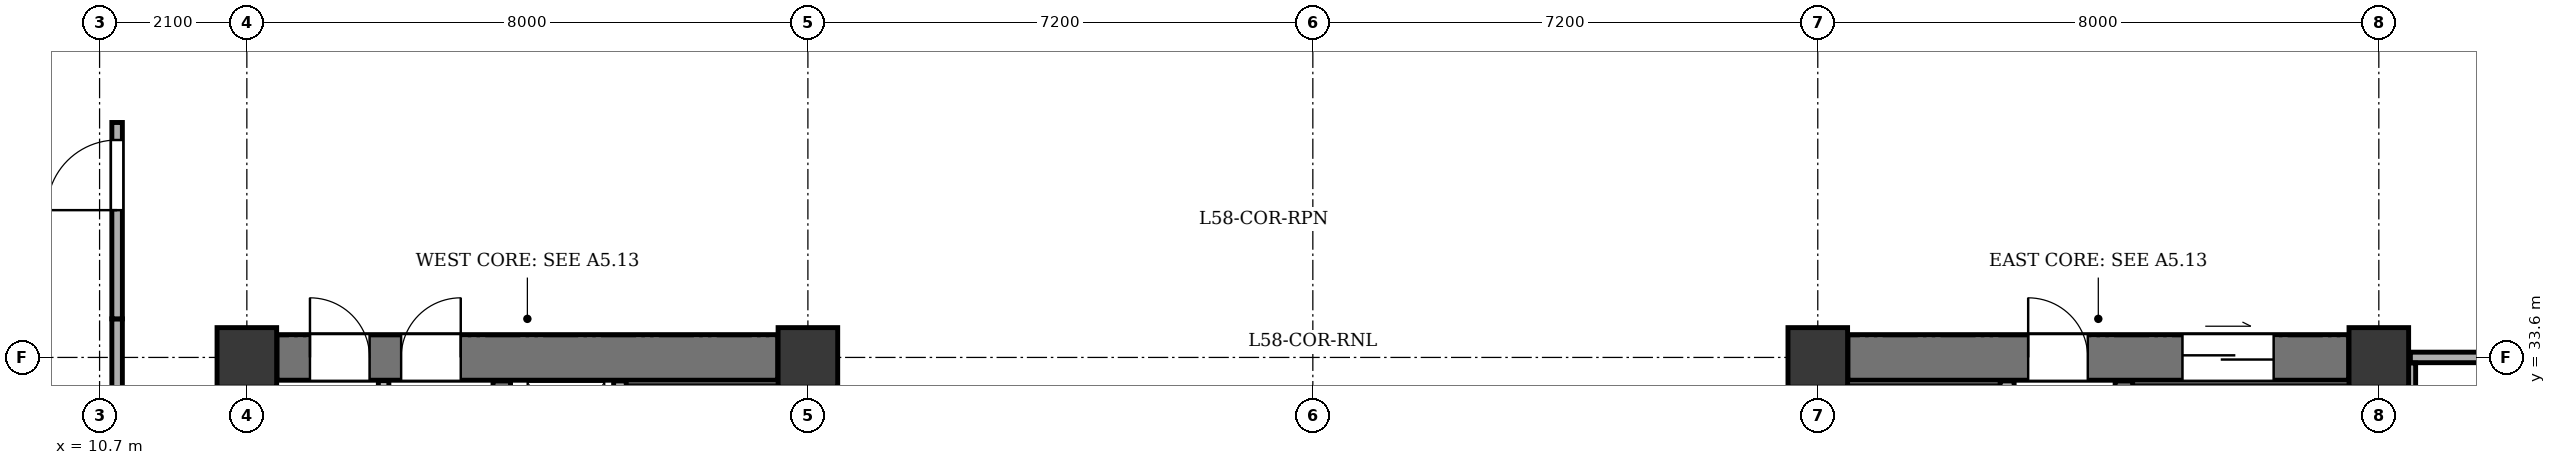
"""IFC4 building model, lengths in metres.
Left out: names, types, materials, properties, quantities, classifications, styles, units other than length and angle.
Written with IfcOpenShell. Run it as: python <this file> out.ifc"""

import sys

from ifc_helpers import new_model, si_unit, direction, frame, frame_2d, origin, origin_2d, place, context, subcontext, project, spatial, rectangle, extrude, element, fill, save


model = new_model("IFC4")
c1 = context("Model", 3, precision=1e-05, world=origin(), true_north=direction((0.0, 1.0)))
c2 = subcontext(c1, "Body", "Model", "MODEL_VIEW")
j1 = project(units=[si_unit("LENGTHUNIT", "METRE"), si_unit("PLANEANGLEUNIT", "RADIAN")], contexts=[c1])
p1 = place(None, origin())
s1 = spatial("IfcSite", under=j1, at=p1, CompositionType="ELEMENT")
p2 = place(p1, origin())
s2 = spatial("IfcBuilding", under=s1, at=p2, CompositionType="ELEMENT")
p3 = place(p2, frame((0.0, 0.0, 224.5)))
s3 = spatial("IfcBuildingStorey", under=s2, at=p3, CompositionType="ELEMENT", Elevation=224.5)
for number, where, z_axis, x_axis in (
    (1, (12.8, 33.6, 0.0), (0.0, 0.0, 1.0), (1.0, 0.0, 0.0)),
    (2, (20.8, 33.6, 0.0), (0.0, 0.0, 1.0), (1.0, 0.0, 0.0)),
    (3, (35.2, 33.6, 0.0), (0.0, 0.0, 1.0), (1.0, 0.0, 0.0)),
    (4, (43.2, 33.6, 0.0), (0.0, 0.0, 1.0), (1.0, 0.0, 0.0)),
):
    element("IfcColumn", number, at=place(p3, frame(where, z_axis=z_axis, x_axis=x_axis)), inside=s3, PredefinedType="COLUMN", context=c2, shape_type="SweptSolid", body=[
        extrude(rectangle(XDim=0.85, YDim=0.85, at=origin_2d()), origin(), (0.0, 0.0, 1.0), 3.4),
    ])
p4 = place(p3, frame((13.23, 33.6, 0.0), z_axis=(0.0, 0.0, 1.0), x_axis=(1.0, 0.0, 0.0)))
e5 = element("IfcWall", 5, at=p4, inside=s3, PredefinedType="SHEAR", context=c2, shape_type="SweptSolid", body=[
    extrude(rectangle(XDim=7.14, YDim=0.65, at=frame_2d((3.57, 0.0))), origin(), (0.0, 0.0, 1.0), 2.95),
])
p5 = place(p4, frame((0.47, 0.0, 0.0)))
e6 = element("IfcOpeningElement", 6, at=p5, cuts=e5, PredefinedType="OPENING", context=c2, shape_type="SweptSolid", body=[
    extrude(rectangle(XDim=0.85, YDim=2.02, at=frame_2d((0.425, 1.01))), frame((0.0, 0.335, 0.0), z_axis=(0.0, -1.0, 0.0), x_axis=(1.0, 0.0, 0.0)), (0.0, 0.0, 1.0), 0.67),
])
p6 = place(p4, frame((1.77, 0.0, 0.0)))
e7 = element("IfcOpeningElement", 7, at=p6, cuts=e5, PredefinedType="OPENING", context=c2, shape_type="SweptSolid", body=[
    extrude(rectangle(XDim=0.85, YDim=2.02, at=frame_2d((0.425, 1.01))), frame((0.0, 0.335, 0.0), z_axis=(0.0, -1.0, 0.0), x_axis=(1.0, 0.0, 0.0)), (0.0, 0.0, 1.0), 0.67),
])
p7 = place(p3, frame((16.435, 21.135, 0.0), z_axis=(0.0, 0.0, 1.0), x_axis=(0.0, 1.0, 0.0)))
e8 = element("IfcWall", 8, at=p7, inside=s3, PredefinedType="SHEAR", context=c2, shape_type="SweptSolid", body=[
    extrude(rectangle(XDim=12.13, YDim=0.25, at=frame_2d((6.065, 0.0))), origin(), (0.0, 0.0, 1.0), 2.95),
])
p8 = place(p7, frame((0.515, 0.0, 0.0)))
e9 = element("IfcOpeningElement", 9, at=p8, cuts=e8, PredefinedType="OPENING", context=c2, shape_type="SweptSolid", body=[
    extrude(rectangle(XDim=1.2, YDim=2.15, at=frame_2d((0.6, 1.075))), frame((0.0, 0.135, 0.0), z_axis=(0.0, -1.0, 0.0), x_axis=(1.0, 0.0, 0.0)), (0.0, 0.0, 1.0), 0.27),
])
p9 = place(p7, frame((2.665, 0.0, 0.0)))
e10 = element("IfcOpeningElement", 10, at=p9, cuts=e8, PredefinedType="OPENING", context=c2, shape_type="SweptSolid", body=[
    extrude(rectangle(XDim=1.15, YDim=2.15, at=frame_2d((0.575, 1.075))), frame((0.0, 0.135, 0.0), z_axis=(0.0, -1.0, 0.0), x_axis=(1.0, 0.0, 0.0)), (0.0, 0.0, 1.0), 0.27),
])
p10 = place(p3, frame((18.12, 31.17, 0.0), z_axis=(0.0, 0.0, 1.0), x_axis=(0.0, 1.0, 0.0)))
e11 = element("IfcWall", 11, at=p10, inside=s3, PredefinedType="PARTITIONING", context=c2, shape_type="SweptSolid", body=[
    extrude(rectangle(XDim=2.095, YDim=0.18, at=frame_2d((1.047, 0.0))), origin(), (0.0, 0.0, 1.0), 2.95),
])
p11 = place(p3, frame((35.63, 33.6, 0.0), z_axis=(0.0, 0.0, 1.0), x_axis=(1.0, 0.0, 0.0)))
e12 = element("IfcWall", 12, at=p11, inside=s3, PredefinedType="SHEAR", context=c2, shape_type="SweptSolid", body=[
    extrude(rectangle(XDim=7.14, YDim=0.65, at=frame_2d((3.57, 0.0))), origin(), (0.0, 0.0, 1.0), 2.95),
])
p12 = place(p11, frame((4.77, 0.0, 0.0)))
e13 = element("IfcOpeningElement", 13, at=p12, cuts=e12, PredefinedType="OPENING", context=c2, shape_type="SweptSolid", body=[
    extrude(rectangle(XDim=1.3, YDim=2.15, at=frame_2d((0.65, 1.075))), frame((0.0, 0.335, 0.0), z_axis=(0.0, -1.0, 0.0), x_axis=(1.0, 0.0, 0.0)), (0.0, 0.0, 1.0), 0.67),
])
p13 = place(p11, frame((2.57, 0.0, 0.0)))
e14 = element("IfcOpeningElement", 14, at=p13, cuts=e12, PredefinedType="OPENING", context=c2, shape_type="SweptSolid", body=[
    extrude(rectangle(XDim=0.85, YDim=2.02, at=frame_2d((0.425, 1.01))), frame((0.0, 0.335, 0.0), z_axis=(0.0, -1.0, 0.0), x_axis=(1.0, 0.0, 0.0)), (0.0, 0.0, 1.0), 0.67),
])
p14 = place(p3, frame((39.565, 21.135, 0.0), z_axis=(0.0, 0.0, 1.0), x_axis=(0.0, 1.0, 0.0)))
e15 = element("IfcWall", 15, at=p14, inside=s3, PredefinedType="SHEAR", context=c2, shape_type="SweptSolid", body=[
    extrude(rectangle(XDim=12.13, YDim=0.25, at=frame_2d((6.065, 0.0))), origin(), (0.0, 0.0, 1.0), 2.95),
])
p15 = place(p14, frame((0.515, 0.0, 0.0)))
e16 = element("IfcOpeningElement", 16, at=p15, cuts=e15, PredefinedType="OPENING", context=c2, shape_type="SweptSolid", body=[
    extrude(rectangle(XDim=1.2, YDim=2.15, at=frame_2d((0.6, 1.075))), frame((0.0, 0.135, 0.0), z_axis=(0.0, -1.0, 0.0), x_axis=(1.0, 0.0, 0.0)), (0.0, 0.0, 1.0), 0.27),
])
p16 = place(p14, frame((2.665, 0.0, 0.0)))
e17 = element("IfcOpeningElement", 17, at=p16, cuts=e15, PredefinedType="OPENING", context=c2, shape_type="SweptSolid", body=[
    extrude(rectangle(XDim=1.15, YDim=2.15, at=frame_2d((0.575, 1.075))), frame((0.0, 0.135, 0.0), z_axis=(0.0, -1.0, 0.0), x_axis=(1.0, 0.0, 0.0)), (0.0, 0.0, 1.0), 0.27),
])
p17 = place(p3, frame((37.9, 25.27, 0.0), z_axis=(0.0, 0.0, 1.0), x_axis=(0.0, 1.0, 0.0)))
e18 = element("IfcWall", 18, at=p17, inside=s3, PredefinedType="SOLIDWALL", context=c2, shape_type="SweptSolid", body=[
    extrude(rectangle(XDim=7.995, YDim=0.2, at=frame_2d((3.998, 0.0))), origin(), (0.0, 0.0, 1.0), 2.95),
])
p18 = place(p3, frame((14.75, 30.96, 0.0), z_axis=(0.0, 0.0, 1.0), x_axis=(0.0, 1.0, 0.0)))
e19 = element("IfcWall", 19, at=p18, inside=s3, PredefinedType="PARTITIONING", context=c2, shape_type="SweptSolid", body=[
    extrude(rectangle(XDim=2.31, YDim=0.15, at=frame_2d((1.155, 0.0))), origin(), (0.0, 0.0, 1.0), 2.95),
])
p19 = place(p18, frame((0.47, 0.0, 0.0)))
e20 = element("IfcOpeningElement", 20, at=p19, cuts=e19, PredefinedType="OPENING", context=c2, shape_type="SweptSolid", body=[
    extrude(rectangle(XDim=0.85, YDim=2.02, at=frame_2d((0.425, 1.01))), frame((0.0, 0.085, 0.0), z_axis=(0.0, -1.0, 0.0), x_axis=(1.0, 0.0, 0.0)), (0.0, 0.0, 1.0), 0.17),
])
p20 = place(p3, frame((10.95, 20.25, 0.0), z_axis=(0.0, 0.0, 1.0), x_axis=(0.0, 1.0, 0.0)))
e21 = element("IfcWall", 21, at=p20, inside=s3, PredefinedType="PARTITIONING", context=c2, shape_type="SweptSolid", body=[
    extrude(rectangle(XDim=13.9, YDim=0.15, at=frame_2d((6.95, 0.0))), origin(), (0.0, 0.0, 1.0), 2.335),
])
p21 = place(p3, frame((10.95, 34.15, 0.0), z_axis=(0.0, 0.0, 1.0), x_axis=(0.0, 1.0, 0.0)))
e22 = element("IfcWall", 22, at=p21, inside=s3, PredefinedType="PARTITIONING", context=c2, shape_type="SweptSolid", body=[
    extrude(rectangle(XDim=2.8, YDim=0.15, at=frame_2d((1.4, 0.0))), origin(), (0.0, 0.0, 1.0), 2.335),
])
p22 = place(p21, frame((1.55, 0.0, 0.0)))
e23 = element("IfcOpeningElement", 23, at=p22, cuts=e22, PredefinedType="OPENING", context=c2, shape_type="SweptSolid", body=[
    extrude(rectangle(XDim=1.0, YDim=2.1, at=frame_2d((0.5, 1.05))), frame((0.0, 0.085, 0.0), z_axis=(0.0, -1.0, 0.0), x_axis=(1.0, 0.0, 0.0)), (0.0, 0.0, 1.0), 0.17),
])
p23 = place(p3, frame((43.65, 33.6, 0.0), z_axis=(0.0, 0.0, 1.0), x_axis=(1.0, 0.0, 0.0)))
e24 = element("IfcWall", 24, at=p23, inside=s3, PredefinedType="PARTITIONING", context=c2, shape_type="SweptSolid", body=[
    extrude(rectangle(XDim=5.305, YDim=0.15, at=frame_2d((2.653, 0.0))), origin(), (0.0, 0.0, 1.0), 2.135),
])
p24 = place(p3, frame((43.65, 20.25, 0.0), z_axis=(0.0, 0.0, 1.0), x_axis=(0.0, 1.0, 0.0)))
e25 = element("IfcWall", 25, at=p24, inside=s3, PredefinedType="PARTITIONING", context=c2, shape_type="SweptSolid", body=[
    extrude(rectangle(XDim=13.27, YDim=0.15, at=frame_2d((6.635, 0.0))), origin(), (0.0, 0.0, 1.0), 2.95),
])
p25 = place(p5, origin())
e26 = element("IfcDoor", 26, at=p25, inside=s3, OperationType="SINGLE_SWING_LEFT", PredefinedType="DOOR", context=c2, shape_type="SweptSolid", body=[
    extrude(rectangle(XDim=0.85, YDim=2.02, at=frame_2d((0.425, 1.01))), frame((0.0, 0.025, 0.0), z_axis=(0.0, -1.0, 0.0), x_axis=(1.0, 0.0, 0.0)), (0.0, 0.0, 1.0), 0.05),
])
fill(e6, e26)
p26 = place(p6, origin())
e27 = element("IfcDoor", 27, at=p26, inside=s3, OperationType="SINGLE_SWING_RIGHT", PredefinedType="DOOR", context=c2, shape_type="SweptSolid", body=[
    extrude(rectangle(XDim=0.85, YDim=2.02, at=frame_2d((0.425, 1.01))), frame((0.0, 0.025, 0.0), z_axis=(0.0, -1.0, 0.0), x_axis=(1.0, 0.0, 0.0)), (0.0, 0.0, 1.0), 0.05),
])
fill(e7, e27)
p27 = place(p12, origin())
e28 = element("IfcDoor", 28, at=p27, inside=s3, OperationType="DOUBLE_DOOR_SLIDING", PredefinedType="DOOR", context=c2, shape_type="SweptSolid", body=[
    extrude(rectangle(XDim=1.3, YDim=2.15, at=frame_2d((0.65, 1.075))), frame((0.0, 0.025, 0.0), z_axis=(0.0, -1.0, 0.0), x_axis=(1.0, 0.0, 0.0)), (0.0, 0.0, 1.0), 0.05),
])
fill(e13, e28)
p28 = place(p13, origin())
e29 = element("IfcDoor", 29, at=p28, inside=s3, OperationType="SINGLE_SWING_LEFT", PredefinedType="DOOR", context=c2, shape_type="SweptSolid", body=[
    extrude(rectangle(XDim=0.85, YDim=2.02, at=frame_2d((0.425, 1.01))), frame((0.0, 0.025, 0.0), z_axis=(0.0, -1.0, 0.0), x_axis=(1.0, 0.0, 0.0)), (0.0, 0.0, 1.0), 0.05),
])
fill(e14, e29)
p29 = place(p22, origin())
e30 = element("IfcDoor", 30, at=p29, inside=s3, OperationType="SINGLE_SWING_LEFT", PredefinedType="DOOR", context=c2, shape_type="SweptSolid", body=[
    extrude(rectangle(XDim=1.0, YDim=2.1, at=frame_2d((0.5, 1.05))), frame((0.0, 0.025, 0.0), z_axis=(0.0, -1.0, 0.0), x_axis=(1.0, 0.0, 0.0)), (0.0, 0.0, 1.0), 0.05),
])
fill(e23, e30)
save(model, sys.argv[1])
